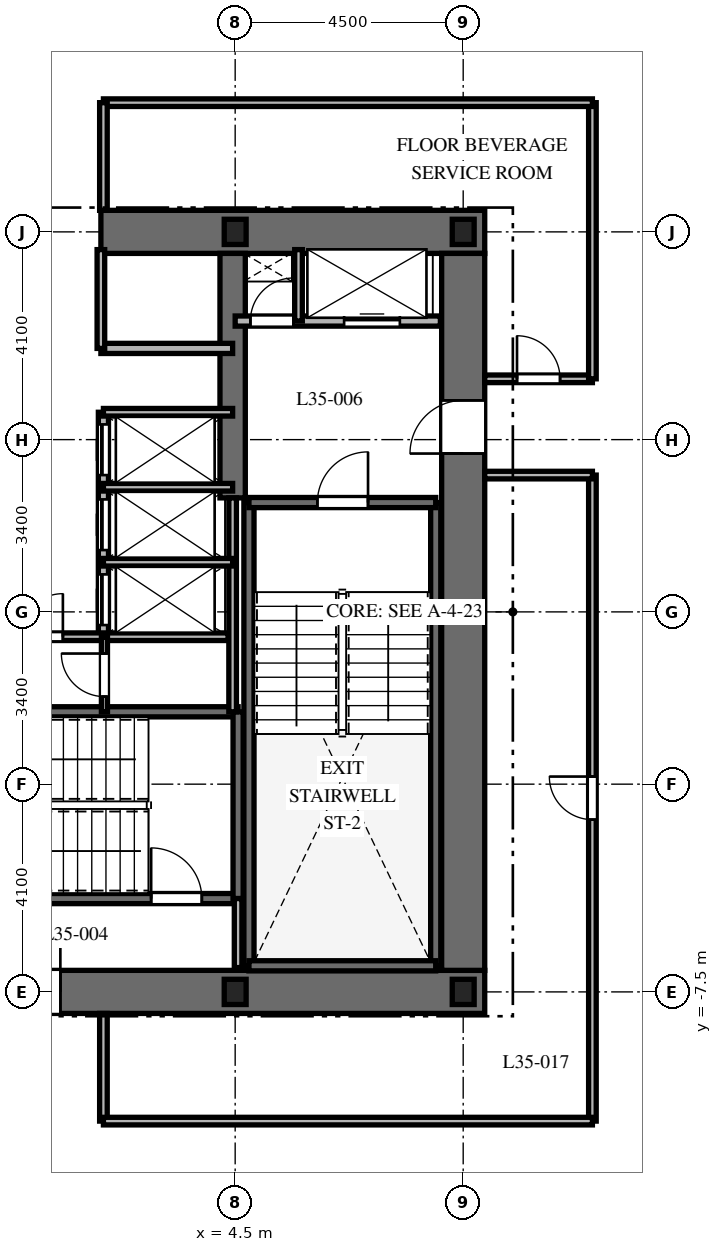
"""IFC4 building model, lengths in metres.
Left out: names, types, materials, properties, quantities, classifications, styles, units other than length and angle.
Written with IfcOpenShell. Run it as: python <this file> out.ifc"""

import sys

from ifc_helpers import new_model, si_unit, direction, frame, frame_2d, origin, origin_2d, place, context, subcontext, project, spatial, rectangle, i_section, extrude, element, fill, save


model = new_model("IFC4")
c1 = context("Model", 3, precision=1e-05, world=origin(), true_north=direction((0.0, 1.0)))
c2 = subcontext(c1, "Body", "Model", "MODEL_VIEW")
j1 = project(units=[si_unit("LENGTHUNIT", "METRE"), si_unit("PLANEANGLEUNIT", "RADIAN")], contexts=[c1])
p1 = place(None, origin())
s1 = spatial("IfcSite", under=j1, at=p1, CompositionType="ELEMENT")
p2 = place(p1, origin())
s2 = spatial("IfcBuilding", under=s1, at=p2, CompositionType="ELEMENT")
p3 = place(p2, frame((0.0, 0.0, 144.3)))
s3 = spatial("IfcBuildingStorey", under=s2, at=p3, CompositionType="ELEMENT", Elevation=144.3)
p4 = place(p3, frame((-9.425, -7.5, 0.0), z_axis=(0.0, 0.0, 1.0), x_axis=(1.0, 0.0, 0.0)))
e1 = element("IfcWall", 1, at=p4, inside=s3, PredefinedType="SHEAR", context=c2, shape_type="SweptSolid", body=[
    extrude(rectangle(XDim=18.85, YDim=0.85, at=frame_2d((9.425, 0.0))), origin(), (0.0, 0.0, 1.0), 3.7),
])
p5 = place(p4, frame((9.475, 0.0, 0.0)))
e2 = element("IfcOpeningElement", 2, at=p5, cuts=e1, PredefinedType="OPENING", context=c2, shape_type="SweptSolid", body=[
    extrude(rectangle(XDim=1.0, YDim=2.15, at=frame_2d((0.5, 1.075))), frame((0.0, 0.435, 0.0), z_axis=(0.0, -1.0, 0.0), x_axis=(1.0, 0.0, 0.0)), (0.0, 0.0, 1.0), 0.87),
])
p6 = place(p3, frame((1.85, 7.5, 0.0), z_axis=(0.0, 0.0, 1.0), x_axis=(1.0, 0.0, 0.0)))
e3 = element("IfcWall", 3, at=p6, inside=s3, PredefinedType="SHEAR", context=c2, shape_type="SweptSolid", body=[
    extrude(rectangle(XDim=7.575, YDim=0.85, at=frame_2d((3.788, 0.0))), origin(), (0.0, 0.0, 1.0), 3.7),
])
p7 = place(p3, frame((9.0, -7.075, 0.0), z_axis=(0.0, 0.0, 1.0), x_axis=(0.0, 1.0, 0.0)))
e4 = element("IfcWall", 4, at=p7, inside=s3, PredefinedType="SHEAR", context=c2, shape_type="SweptSolid", body=[
    extrude(rectangle(XDim=14.15, YDim=0.85, at=frame_2d((7.075, 0.0))), origin(), (0.0, 0.0, 1.0), 3.7),
])
p8 = place(p7, frame((10.2, 0.0, 0.0)))
e5 = element("IfcOpeningElement", 5, at=p8, cuts=e4, PredefinedType="OPENING", context=c2, shape_type="SweptSolid", body=[
    extrude(rectangle(XDim=1.05, YDim=2.15, at=frame_2d((0.525, 1.075))), frame((0.0, 0.435, 0.0), z_axis=(0.0, -1.0, 0.0), x_axis=(1.0, 0.0, 0.0)), (0.0, 0.0, 1.0), 0.87),
])
p9 = place(p3, frame((4.45, 2.25, 0.0), z_axis=(0.0, 0.0, 1.0), x_axis=(0.0, 1.0, 0.0)))
e6 = element("IfcWall", 6, at=p9, inside=s3, PredefinedType="SHEAR", context=c2, shape_type="SweptSolid", body=[
    extrude(rectangle(XDim=4.825, YDim=0.5, at=frame_2d((2.413, 0.0))), origin(), (0.0, 0.0, 1.0), 3.7),
])
for number, where, z_axis, x_axis in (
    (7, (4.772, -6.985, 0.0), (0.0, 0.0, 1.0), (0.0, 1.0, 0.0)),
    (8, (8.458, -6.985, 0.0), (0.0, 0.0, 1.0), (0.0, 1.0, 0.0)),
):
    element("IfcWall", number, at=place(p3, frame(where, z_axis=z_axis, x_axis=x_axis)), inside=s3, PredefinedType="SHEAR", context=c2, shape_type="SweptSolid", body=[
        extrude(rectangle(XDim=9.143, YDim=0.2, at=frame_2d((4.572, 0.0))), origin(), (0.0, 0.0, 1.0), 3.7),
    ])
p10 = place(p3, frame((4.772, -6.985, 0.0), z_axis=(0.0, 0.0, 1.0), x_axis=(1.0, 0.0, 0.0)))
e9 = element("IfcWall", 9, at=p10, inside=s3, PredefinedType="SHEAR", context=c2, shape_type="SweptSolid", body=[
    extrude(rectangle(XDim=3.686, YDim=0.2, at=frame_2d((1.843, 0.0))), origin(), (0.0, 0.0, 1.0), 3.7),
])
p11 = place(p3, frame((4.772, 2.158, 0.0), z_axis=(0.0, 0.0, 1.0), x_axis=(1.0, 0.0, 0.0)))
e10 = element("IfcWall", 10, at=p11, inside=s3, PredefinedType="SHEAR", context=c2, shape_type="SweptSolid", body=[
    extrude(rectangle(XDim=3.686, YDim=0.2, at=frame_2d((1.843, 0.0))), origin(), (0.0, 0.0, 1.0), 3.7),
])
p12 = place(p11, frame((1.35, 0.0, 0.0)))
e11 = element("IfcOpeningElement", 11, at=p12, cuts=e10, PredefinedType="OPENING", context=c2, shape_type="SweptSolid", body=[
    extrude(rectangle(XDim=1.0, YDim=2.15, at=frame_2d((0.5, 1.075))), frame((0.0, 0.11, 0.0), z_axis=(0.0, -1.0, 0.0), x_axis=(1.0, 0.0, 0.0)), (0.0, 0.0, 1.0), 0.22),
])
p13 = place(p3, frame((-4.608, -5.658, 0.0), z_axis=(0.0, 0.0, 1.0), x_axis=(1.0, 0.0, 0.0)))
e12 = element("IfcWall", 12, at=p13, inside=s3, PredefinedType="SHEAR", context=c2, shape_type="SweptSolid", body=[
    extrude(rectangle(XDim=9.166, YDim=0.2, at=frame_2d((4.583, 0.0))), origin(), (0.0, 0.0, 1.0), 3.7),
])
p14 = place(p13, frame((7.45, 0.0, 0.0)))
e13 = element("IfcOpeningElement", 13, at=p14, cuts=e12, PredefinedType="OPENING", context=c2, shape_type="SweptSolid", body=[
    extrude(rectangle(XDim=1.0, YDim=2.15, at=frame_2d((0.5, 1.075))), frame((0.0, 0.11, 0.0), z_axis=(0.0, -1.0, 0.0), x_axis=(1.0, 0.0, 0.0)), (0.0, 0.0, 1.0), 0.22),
])
p15 = place(p3, frame((-4.608, -1.972, 0.0), z_axis=(0.0, 0.0, 1.0), x_axis=(1.0, 0.0, 0.0)))
e14 = element("IfcWall", 14, at=p15, inside=s3, PredefinedType="SHEAR", context=c2, shape_type="SweptSolid", body=[
    extrude(rectangle(XDim=9.166, YDim=0.2, at=frame_2d((4.583, 0.0))), origin(), (0.0, 0.0, 1.0), 3.7),
])
p16 = place(p3, frame((4.558, -5.658, 0.0), z_axis=(0.0, 0.0, 1.0), x_axis=(0.0, 1.0, 0.0)))
e15 = element("IfcWall", 15, at=p16, inside=s3, PredefinedType="SHEAR", context=c2, shape_type="SweptSolid", body=[
    extrude(rectangle(XDim=3.686, YDim=0.2, at=frame_2d((1.843, 0.0))), origin(), (0.0, 0.0, 1.0), 3.7),
])
for number, where, z_axis, x_axis in (
    (16, (4.5, -7.5, 0.0), (0.0, 0.0, 1.0), (1.0, 0.0, 0.0)),
    (17, (9.0, -7.5, 0.0), (0.0, 0.0, 1.0), (1.0, 0.0, 0.0)),
    (18, (9.0, 7.5, 0.0), (0.0, 0.0, 1.0), (1.0, 0.0, 0.0)),
    (19, (4.5, 7.5, 0.0), (0.0, 0.0, 1.0), (1.0, 0.0, 0.0)),
):
    element("IfcColumn", number, at=place(p3, frame(where, z_axis=z_axis, x_axis=x_axis)), inside=s3, PredefinedType="COLUMN", context=c2, shape_type="SweptSolid", body=[
        extrude(i_section(OverallWidth=0.432, OverallDepth=0.498, WebThickness=0.056, FlangeThickness=0.089, at=origin_2d()), origin(), (0.0, 0.0, 1.0), 3.7),
    ])
p17 = place(p3, frame((4.558, -7.02, 0.0), z_axis=(0.0, 0.0, 1.0), x_axis=(0.0, 1.0, 0.0)))
e20 = element("IfcWall", 20, at=p17, inside=s3, PredefinedType="PARTITIONING", context=c2, shape_type="SweptSolid", body=[
    extrude(rectangle(XDim=1.362, YDim=0.15, at=frame_2d((0.681, 0.0))), origin(), (0.0, 0.0, 1.0), 3.4),
])
p18 = place(p3, frame((4.5, 5.74, 0.0), z_axis=(0.0, 0.0, 1.0), x_axis=(1.0, 0.0, 0.0)))
e21 = element("IfcWall", 21, at=p18, inside=s3, PredefinedType="PARTITIONING", context=c2, shape_type="SweptSolid", body=[
    extrude(rectangle(XDim=4.05, YDim=0.2, at=frame_2d((2.025, 0.0))), origin(), (0.0, 0.0, 1.0), 3.4),
])
p19 = place(p18, frame((0.3, 0.0, 0.0)))
e22 = element("IfcOpeningElement", 22, at=p19, cuts=e21, PredefinedType="OPENING", context=c2, shape_type="SweptSolid", body=[
    extrude(rectangle(XDim=0.85, YDim=2.03, at=frame_2d((0.425, 1.015))), frame((0.0, 0.11, 0.0), z_axis=(0.0, -1.0, 0.0), x_axis=(1.0, 0.0, 0.0)), (0.0, 0.0, 1.0), 0.22),
])
p20 = place(p18, frame((2.15, 0.0, 0.0)))
e23 = element("IfcOpeningElement", 23, at=p20, cuts=e21, PredefinedType="OPENING", context=c2, shape_type="SweptSolid", body=[
    extrude(rectangle(XDim=1.1, YDim=2.2, at=frame_2d((0.55, 1.1))), frame((0.0, 0.11, 0.0), z_axis=(0.0, -1.0, 0.0), x_axis=(1.0, 0.0, 0.0)), (0.0, 0.0, 1.0), 0.22),
])
p21 = place(p3, frame((5.75, 5.74, 0.0), z_axis=(0.0, 0.0, 1.0), x_axis=(0.0, 1.0, 0.0)))
e24 = element("IfcWall", 24, at=p21, inside=s3, PredefinedType="PARTITIONING", context=c2, shape_type="SweptSolid", body=[
    extrude(rectangle(XDim=1.41, YDim=0.15, at=frame_2d((0.705, 0.0))), origin(), (0.0, 0.0, 1.0), 3.4),
])
p22 = place(p3, frame((1.85, 5.2, 0.0), z_axis=(0.0, 0.0, 1.0), x_axis=(1.0, 0.0, 0.0)))
e25 = element("IfcWall", 25, at=p22, inside=s3, PredefinedType="PARTITIONING", context=c2, shape_type="SweptSolid", body=[
    extrude(rectangle(XDim=2.6, YDim=0.2, at=frame_2d((1.3, 0.0))), origin(), (0.0, 0.0, 1.0), 3.4),
])
p23 = place(p3, frame((1.85, 5.2, 0.0), z_axis=(0.0, 0.0, 1.0), x_axis=(0.0, 1.0, 0.0)))
e26 = element("IfcWall", 26, at=p23, inside=s3, PredefinedType="PARTITIONING", context=c2, shape_type="SweptSolid", body=[
    extrude(rectangle(XDim=1.95, YDim=0.15, at=frame_2d((0.975, 0.0))), origin(), (0.0, 0.0, 1.0), 3.4),
])
p24 = place(p3, frame((4.45, -1.972, 0.0), z_axis=(0.0, 0.0, 1.0), x_axis=(0.0, 1.0, 0.0)))
e27 = element("IfcWall", 27, at=p24, inside=s3, PredefinedType="PARTITIONING", context=c2, shape_type="SweptSolid", body=[
    extrude(rectangle(XDim=4.222, YDim=0.15, at=frame_2d((2.111, 0.0))), origin(), (0.0, 0.0, 1.0), 3.4),
])
p25 = place(p3, frame((1.9, -0.5, 0.0), z_axis=(0.0, 0.0, 1.0), x_axis=(0.0, 1.0, 0.0)))
e28 = element("IfcWall", 28, at=p25, inside=s3, PredefinedType="PARTITIONING", context=c2, shape_type="SweptSolid", body=[
    extrude(rectangle(XDim=4.44, YDim=0.2, at=frame_2d((2.22, 0.0))), origin(), (0.0, 0.0, 1.0), 3.4),
])
p26 = place(p25, frame((0.24, 0.0, 0.0)))
e29 = element("IfcOpeningElement", 29, at=p26, cuts=e28, PredefinedType="OPENING", context=c2, shape_type="SweptSolid", body=[
    extrude(rectangle(XDim=1.0, YDim=2.2, at=frame_2d((0.5, 1.1))), frame((0.0, 0.11, 0.0), z_axis=(0.0, -1.0, 0.0), x_axis=(1.0, 0.0, 0.0)), (0.0, 0.0, 1.0), 0.22),
])
p27 = place(p25, frame((1.72, 0.0, 0.0)))
e30 = element("IfcOpeningElement", 30, at=p27, cuts=e28, PredefinedType="OPENING", context=c2, shape_type="SweptSolid", body=[
    extrude(rectangle(XDim=1.0, YDim=2.2, at=frame_2d((0.5, 1.1))), frame((0.0, 0.11, 0.0), z_axis=(0.0, -1.0, 0.0), x_axis=(1.0, 0.0, 0.0)), (0.0, 0.0, 1.0), 0.22),
])
p28 = place(p25, frame((3.2, 0.0, 0.0)))
e31 = element("IfcOpeningElement", 31, at=p28, cuts=e28, PredefinedType="OPENING", context=c2, shape_type="SweptSolid", body=[
    extrude(rectangle(XDim=1.0, YDim=2.2, at=frame_2d((0.5, 1.1))), frame((0.0, 0.11, 0.0), z_axis=(0.0, -1.0, 0.0), x_axis=(1.0, 0.0, 0.0)), (0.0, 0.0, 1.0), 0.22),
])
for number, where, z_axis, x_axis in (
    (32, (1.9, 3.94, 0.0), (0.0, 0.0, 1.0), (1.0, 0.0, 0.0)),
    (33, (1.9, 0.98, 0.0), (0.0, 0.0, 1.0), (1.0, 0.0, 0.0)),
    (34, (1.9, 2.46, 0.0), (0.0, 0.0, 1.0), (1.0, 0.0, 0.0)),
):
    element("IfcWall", number, at=place(p3, frame(where, z_axis=z_axis, x_axis=x_axis)), inside=s3, PredefinedType="PARTITIONING", context=c2, shape_type="SweptSolid", body=[
        extrude(rectangle(XDim=2.55, YDim=0.15, at=frame_2d((1.275, 0.0))), origin(), (0.0, 0.0, 1.0), 3.4),
    ])
p29 = place(p3, frame((-4.36, -0.49, 0.0), z_axis=(0.0, 0.0, 1.0), x_axis=(1.0, 0.0, 0.0)))
e35 = element("IfcWall", 35, at=p29, inside=s3, PredefinedType="PARTITIONING", context=c2, shape_type="SweptSolid", body=[
    extrude(rectangle(XDim=8.72, YDim=0.15, at=frame_2d((4.36, 0.0))), origin(), (0.0, 0.0, 1.0), 3.4),
])
p30 = place(p29, frame((2.81, 0.0, 0.0)))
e36 = element("IfcOpeningElement", 36, at=p30, cuts=e35, PredefinedType="OPENING", context=c2, shape_type="SweptSolid", body=[
    extrude(rectangle(XDim=0.85, YDim=2.03, at=frame_2d((0.425, 1.015))), frame((0.0, 0.085, 0.0), z_axis=(0.0, -1.0, 0.0), x_axis=(1.0, 0.0, 0.0)), (0.0, 0.0, 1.0), 0.17),
])
p31 = place(p29, frame((4.61, 0.0, 0.0)))
e37 = element("IfcOpeningElement", 37, at=p31, cuts=e35, PredefinedType="OPENING", context=c2, shape_type="SweptSolid", body=[
    extrude(rectangle(XDim=0.85, YDim=2.03, at=frame_2d((0.425, 1.015))), frame((0.0, 0.085, 0.0), z_axis=(0.0, -1.0, 0.0), x_axis=(1.0, 0.0, 0.0)), (0.0, 0.0, 1.0), 0.17),
])
p32 = place(p3, frame((1.92, -1.972, 0.0), z_axis=(0.0, 0.0, 1.0), x_axis=(0.0, 1.0, 0.0)))
e38 = element("IfcWall", 38, at=p32, inside=s3, PredefinedType="PARTITIONING", context=c2, shape_type="SweptSolid", body=[
    extrude(rectangle(XDim=1.472, YDim=0.12, at=frame_2d((0.736, 0.0))), origin(), (0.0, 0.0, 1.0), 3.4),
])
p33 = place(p32, frame((0.3, 0.0, 0.0)))
e39 = element("IfcOpeningElement", 39, at=p33, cuts=e38, PredefinedType="OPENING", context=c2, shape_type="SweptSolid", body=[
    extrude(rectangle(XDim=0.85, YDim=2.03, at=frame_2d((0.425, 1.015))), frame((0.0, 0.07, 0.0), z_axis=(0.0, -1.0, 0.0), x_axis=(1.0, 0.0, 0.0)), (0.0, 0.0, 1.0), 0.14),
])
p34 = place(p3, frame((11.55, -10.05, 0.0), z_axis=(0.0, 0.0, 1.0), x_axis=(0.0, 1.0, 0.0)))
e40 = element("IfcWall", 40, at=p34, inside=s3, PredefinedType="PARTITIONING", context=c2, shape_type="SweptSolid", body=[
    extrude(rectangle(XDim=12.75, YDim=0.15, at=frame_2d((6.375, 0.0))), origin(), (0.0, 0.0, 1.0), 2.84),
])
p35 = place(p34, frame((5.95, 0.0, 0.0)))
e41 = element("IfcOpeningElement", 41, at=p35, cuts=e40, PredefinedType="OPENING", context=c2, shape_type="SweptSolid", body=[
    extrude(rectangle(XDim=0.85, YDim=2.03, at=frame_2d((0.425, 1.015))), frame((0.0, 0.085, 0.0), z_axis=(0.0, -1.0, 0.0), x_axis=(1.0, 0.0, 0.0)), (0.0, 0.0, 1.0), 0.17),
])
p36 = place(p3, frame((11.55, 2.7, 0.0), z_axis=(0.0, 0.0, 1.0), x_axis=(-1.0, 0.0, 0.0)))
e42 = element("IfcWall", 42, at=p36, inside=s3, PredefinedType="PARTITIONING", context=c2, shape_type="SweptSolid", body=[
    extrude(rectangle(XDim=2.125, YDim=0.15, at=frame_2d((1.062, 0.0))), origin(), (0.0, 0.0, 1.0), 3.4),
])
p37 = place(p3, frame((9.425, 4.6, 0.0), z_axis=(0.0, 0.0, 1.0), x_axis=(1.0, 0.0, 0.0)))
e43 = element("IfcWall", 43, at=p37, inside=s3, PredefinedType="PARTITIONING", context=c2, shape_type="SweptSolid", body=[
    extrude(rectangle(XDim=2.125, YDim=0.15, at=frame_2d((1.062, 0.0))), origin(), (0.0, 0.0, 1.0), 3.4),
])
p38 = place(p37, frame((0.637, 0.0, 0.0)))
e44 = element("IfcOpeningElement", 44, at=p38, cuts=e43, PredefinedType="OPENING", context=c2, shape_type="SweptSolid", body=[
    extrude(rectangle(XDim=0.85, YDim=2.03, at=frame_2d((0.425, 1.015))), frame((0.0, 0.085, 0.0), z_axis=(0.0, -1.0, 0.0), x_axis=(1.0, 0.0, 0.0)), (0.0, 0.0, 1.0), 0.17),
])
p39 = place(p3, frame((11.55, 4.6, 0.0), z_axis=(0.0, 0.0, 1.0), x_axis=(0.0, 1.0, 0.0)))
e45 = element("IfcWall", 45, at=p39, inside=s3, PredefinedType="PARTITIONING", context=c2, shape_type="SweptSolid", body=[
    extrude(rectangle(XDim=5.45, YDim=0.15, at=frame_2d((2.725, 0.0))), origin(), (0.0, 0.0, 1.0), 2.84),
])
p40 = place(p3, frame((11.55, 10.05, 0.0), z_axis=(0.0, 0.0, 1.0), x_axis=(-1.0, 0.0, 0.0)))
e46 = element("IfcWall", 46, at=p40, inside=s3, PredefinedType="PARTITIONING", context=c2, shape_type="SweptSolid", body=[
    extrude(rectangle(XDim=9.65, YDim=0.15, at=frame_2d((4.825, 0.0))), origin(), (0.0, 0.0, 1.0), 2.84),
])
for number, where, z_axis, x_axis in (
    (47, (1.9, 10.05, 0.0), (0.0, 0.0, 1.0), (0.0, -1.0, 0.0)),
    (48, (1.9, -7.925, 0.0), (0.0, 0.0, 1.0), (0.0, -1.0, 0.0)),
):
    element("IfcWall", number, at=place(p3, frame(where, z_axis=z_axis, x_axis=x_axis)), inside=s3, PredefinedType="PARTITIONING", context=c2, shape_type="SweptSolid", body=[
        extrude(rectangle(XDim=2.125, YDim=0.15, at=frame_2d((1.062, 0.0))), origin(), (0.0, 0.0, 1.0), 3.4),
    ])
p41 = place(p3, frame((1.9, -10.05, 0.0), z_axis=(0.0, 0.0, 1.0), x_axis=(1.0, 0.0, 0.0)))
e49 = element("IfcWall", 49, at=p41, inside=s3, PredefinedType="PARTITIONING", context=c2, shape_type="SweptSolid", body=[
    extrude(rectangle(XDim=9.65, YDim=0.15, at=frame_2d((4.825, 0.0))), origin(), (0.0, 0.0, 1.0), 2.84),
])
p42 = place(p12, origin())
e50 = element("IfcDoor", 50, at=p42, inside=s3, OperationType="SINGLE_SWING_RIGHT", PredefinedType="DOOR", context=c2, shape_type="SweptSolid", body=[
    extrude(rectangle(XDim=1.0, YDim=2.15, at=frame_2d((0.5, 1.075))), frame((0.0, 0.025, 0.0), z_axis=(0.0, -1.0, 0.0), x_axis=(1.0, 0.0, 0.0)), (0.0, 0.0, 1.0), 0.05),
])
fill(e11, e50)
p43 = place(p14, origin())
e51 = element("IfcDoor", 51, at=p43, inside=s3, OperationType="SINGLE_SWING_LEFT", PredefinedType="DOOR", context=c2, shape_type="SweptSolid", body=[
    extrude(rectangle(XDim=1.0, YDim=2.15, at=frame_2d((0.5, 1.075))), frame((0.0, 0.025, 0.0), z_axis=(0.0, -1.0, 0.0), x_axis=(1.0, 0.0, 0.0)), (0.0, 0.0, 1.0), 0.05),
])
fill(e13, e51)
p44 = place(p5, origin())
e52 = element("IfcDoor", 52, at=p44, inside=s3, OperationType="SINGLE_SWING_RIGHT", PredefinedType="DOOR", context=c2, shape_type="SweptSolid", body=[
    extrude(rectangle(XDim=1.0, YDim=2.15, at=frame_2d((0.5, 1.075))), frame((0.0, 0.025, 0.0), z_axis=(0.0, -1.0, 0.0), x_axis=(1.0, 0.0, 0.0)), (0.0, 0.0, 1.0), 0.05),
])
fill(e2, e52)
p45 = place(p8, origin())
e53 = element("IfcDoor", 53, at=p45, inside=s3, OperationType="SINGLE_SWING_LEFT", PredefinedType="DOOR", context=c2, shape_type="SweptSolid", body=[
    extrude(rectangle(XDim=1.05, YDim=2.15, at=frame_2d((0.525, 1.075))), frame((0.0, 0.025, 0.0), z_axis=(0.0, -1.0, 0.0), x_axis=(1.0, 0.0, 0.0)), (0.0, 0.0, 1.0), 0.05),
])
fill(e5, e53)
p46 = place(p19, origin())
e54 = element("IfcDoor", 54, at=p46, inside=s3, OperationType="SINGLE_SWING_RIGHT", PredefinedType="DOOR", context=c2, shape_type="SweptSolid", body=[
    extrude(rectangle(XDim=0.85, YDim=2.03, at=frame_2d((0.425, 1.015))), frame((0.0, 0.025, 0.0), z_axis=(0.0, -1.0, 0.0), x_axis=(1.0, 0.0, 0.0)), (0.0, 0.0, 1.0), 0.05),
])
fill(e22, e54)
p47 = place(p20, origin())
e55 = element("IfcDoor", 55, at=p47, inside=s3, OperationType="SLIDING_TO_RIGHT", PredefinedType="DOOR", context=c2, shape_type="SweptSolid", body=[
    extrude(rectangle(XDim=1.1, YDim=2.2, at=frame_2d((0.55, 1.1))), frame((0.0, 0.025, 0.0), z_axis=(0.0, -1.0, 0.0), x_axis=(1.0, 0.0, 0.0)), (0.0, 0.0, 1.0), 0.05),
])
fill(e23, e55)
p48 = place(p26, origin())
e56 = element("IfcDoor", 56, at=p48, inside=s3, OperationType="SLIDING_TO_RIGHT", PredefinedType="DOOR", context=c2, shape_type="SweptSolid", body=[
    extrude(rectangle(XDim=1.0, YDim=2.2, at=frame_2d((0.5, 1.1))), frame((0.0, 0.025, 0.0), z_axis=(0.0, -1.0, 0.0), x_axis=(1.0, 0.0, 0.0)), (0.0, 0.0, 1.0), 0.05),
])
fill(e29, e56)
p49 = place(p27, origin())
e57 = element("IfcDoor", 57, at=p49, inside=s3, OperationType="SLIDING_TO_RIGHT", PredefinedType="DOOR", context=c2, shape_type="SweptSolid", body=[
    extrude(rectangle(XDim=1.0, YDim=2.2, at=frame_2d((0.5, 1.1))), frame((0.0, 0.025, 0.0), z_axis=(0.0, -1.0, 0.0), x_axis=(1.0, 0.0, 0.0)), (0.0, 0.0, 1.0), 0.05),
])
fill(e30, e57)
p50 = place(p28, origin())
e58 = element("IfcDoor", 58, at=p50, inside=s3, OperationType="SLIDING_TO_RIGHT", PredefinedType="DOOR", context=c2, shape_type="SweptSolid", body=[
    extrude(rectangle(XDim=1.0, YDim=2.2, at=frame_2d((0.5, 1.1))), frame((0.0, 0.025, 0.0), z_axis=(0.0, -1.0, 0.0), x_axis=(1.0, 0.0, 0.0)), (0.0, 0.0, 1.0), 0.05),
])
fill(e31, e58)
p51 = place(p31, origin())
e59 = element("IfcDoor", 59, at=p51, inside=s3, OperationType="SINGLE_SWING_RIGHT", PredefinedType="DOOR", context=c2, shape_type="SweptSolid", body=[
    extrude(rectangle(XDim=0.85, YDim=2.03, at=frame_2d((0.425, 1.015))), frame((0.0, 0.025, 0.0), z_axis=(0.0, -1.0, 0.0), x_axis=(1.0, 0.0, 0.0)), (0.0, 0.0, 1.0), 0.05),
])
fill(e37, e59)
p52 = place(p33, origin())
e60 = element("IfcDoor", 60, at=p52, inside=s3, OperationType="SINGLE_SWING_RIGHT", PredefinedType="DOOR", context=c2, shape_type="SweptSolid", body=[
    extrude(rectangle(XDim=0.85, YDim=2.03, at=frame_2d((0.425, 1.015))), frame((0.0, 0.025, 0.0), z_axis=(0.0, -1.0, 0.0), x_axis=(1.0, 0.0, 0.0)), (0.0, 0.0, 1.0), 0.05),
])
fill(e39, e60)
p53 = place(p38, origin())
e61 = element("IfcDoor", 61, at=p53, inside=s3, OperationType="SINGLE_SWING_LEFT", PredefinedType="DOOR", context=c2, shape_type="SweptSolid", body=[
    extrude(rectangle(XDim=0.85, YDim=2.03, at=frame_2d((0.425, 1.015))), frame((0.0, 0.025, 0.0), z_axis=(0.0, -1.0, 0.0), x_axis=(1.0, 0.0, 0.0)), (0.0, 0.0, 1.0), 0.05),
])
fill(e44, e61)
p54 = place(p35, origin())
e62 = element("IfcDoor", 62, at=p54, inside=s3, OperationType="SINGLE_SWING_RIGHT", PredefinedType="DOOR", context=c2, shape_type="SweptSolid", body=[
    extrude(rectangle(XDim=0.85, YDim=2.03, at=frame_2d((0.425, 1.015))), frame((0.0, 0.025, 0.0), z_axis=(0.0, -1.0, 0.0), x_axis=(1.0, 0.0, 0.0)), (0.0, 0.0, 1.0), 0.05),
])
fill(e41, e62)
save(model, sys.argv[1])
